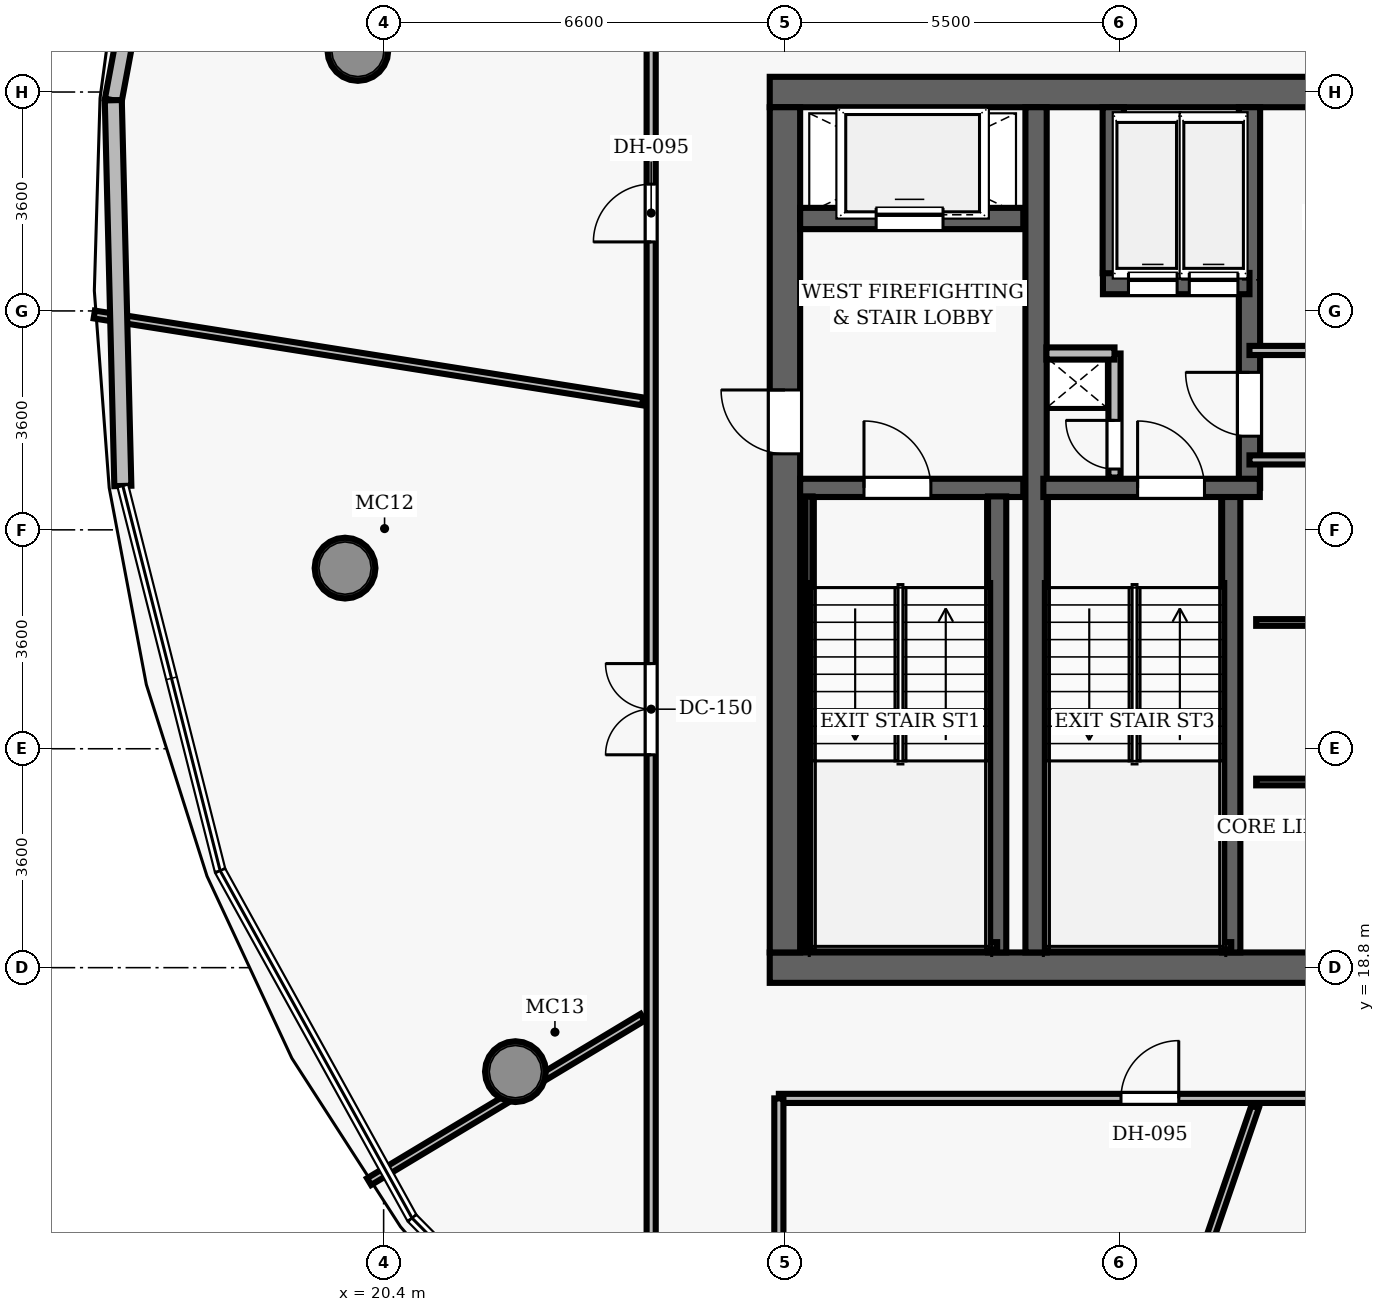
"""IFC4 building model, lengths in metres.
Left out: names, types, materials, properties, quantities, classifications, styles, units other than length and angle.
Written with IfcOpenShell. Run it as: python <this file> out.ifc"""

import sys

from ifc_helpers import new_model, si_unit, direction, frame, frame_2d, origin, origin_2d, place, context, subcontext, project, spatial, rectangle, hollow_circle, extrude, element, fill, save


model = new_model("IFC4")
c1 = context("Model", 3, precision=1e-05, world=origin(), true_north=direction((0.0, 1.0)))
c2 = subcontext(c1, "Body", "Model", "MODEL_VIEW")
j1 = project(units=[si_unit("LENGTHUNIT", "METRE"), si_unit("PLANEANGLEUNIT", "RADIAN")], contexts=[c1])
p1 = place(None, origin())
s1 = spatial("IfcSite", under=j1, at=p1, CompositionType="ELEMENT")
p2 = place(p1, origin())
s2 = spatial("IfcBuilding", under=s1, at=p2, CompositionType="ELEMENT")
p3 = place(p2, frame((0.0, 0.0, 245.9)))
s3 = spatial("IfcBuildingStorey", under=s2, at=p3, CompositionType="ELEMENT", Elevation=245.9)
p4 = place(p3, frame((26.75, 18.8, 0.0), z_axis=(0.0, 0.0, 1.0), x_axis=(1.0, 0.0, 0.0)))
e1 = element("IfcWall", 1, at=p4, inside=s3, PredefinedType="SHEAR", context=c2, shape_type="SweptSolid", body=[
    extrude(rectangle(XDim=22.5, YDim=0.5, at=frame_2d((11.25, 0.0))), origin(), (0.0, 0.0, 1.0), 3.85),
])
p5 = place(p4, frame((14.47, 0.0, 0.0)))
e2 = element("IfcOpeningElement", 2, at=p5, cuts=e1, PredefinedType="OPENING", context=c2, shape_type="SweptSolid", body=[
    extrude(rectangle(XDim=1.05, YDim=2.15, at=frame_2d((0.525, 1.075))), frame((0.0, 0.26, 0.0), z_axis=(0.0, -1.0, 0.0), x_axis=(1.0, 0.0, 0.0)), (0.0, 0.0, 1.0), 0.52),
])
p6 = place(p3, frame((26.75, 33.2, 0.0), z_axis=(0.0, 0.0, 1.0), x_axis=(1.0, 0.0, 0.0)))
e3 = element("IfcWall", 3, at=p6, inside=s3, PredefinedType="SHEAR", context=c2, shape_type="SweptSolid", body=[
    extrude(rectangle(XDim=22.5, YDim=0.5, at=frame_2d((11.25, 0.0))), origin(), (0.0, 0.0, 1.0), 3.85),
])
p7 = place(p3, frame((27.0, 19.05, 0.0), z_axis=(0.0, 0.0, 1.0), x_axis=(0.0, 1.0, 0.0)))
e4 = element("IfcWall", 4, at=p7, inside=s3, PredefinedType="SHEAR", context=c2, shape_type="SweptSolid", body=[
    extrude(rectangle(XDim=13.9, YDim=0.5, at=frame_2d((6.95, 0.0))), origin(), (0.0, 0.0, 1.0), 3.85),
])
p8 = place(p7, frame((8.2, 0.0, 0.0)))
e5 = element("IfcOpeningElement", 5, at=p8, cuts=e4, PredefinedType="OPENING", context=c2, shape_type="SweptSolid", body=[
    extrude(rectangle(XDim=1.05, YDim=2.15, at=frame_2d((0.525, 1.075))), frame((0.0, 0.26, 0.0), z_axis=(0.0, -1.0, 0.0), x_axis=(1.0, 0.0, 0.0)), (0.0, 0.0, 1.0), 0.52),
])
p9 = place(p3, frame((31.13, 19.05, 0.0), z_axis=(0.0, 0.0, 1.0), x_axis=(0.0, 1.0, 0.0)))
e6 = element("IfcWall", 6, at=p9, inside=s3, PredefinedType="SHEAR", context=c2, shape_type="SweptSolid", body=[
    extrude(rectangle(XDim=13.9, YDim=0.35, at=frame_2d((6.95, 0.0))), origin(), (0.0, 0.0, 1.0), 3.85),
])
for number, where, z_axis, x_axis in (
    (7, (19.976, 33.884, 0.0), (0.0, 0.0, 1.0), (1.0, 0.0, 0.0)),
    (8, (19.765, 25.371, 0.0), (0.0, 0.0, 1.0), (1.0, 0.0, 0.0)),
    (9, (22.567, 17.09, 0.0), (0.0, 0.0, 1.0), (1.0, 0.0, 0.0)),
):
    element("IfcColumn", number, at=place(p3, frame(where, z_axis=z_axis, x_axis=x_axis)), inside=s3, PredefinedType="COLUMN", context=c2, shape_type="SweptSolid", body=[
        extrude(hollow_circle(Radius=0.5, WallThickness=0.045, at=origin_2d()), origin(), (0.0, 0.0, 1.0), 3.85),
    ])
p10 = place(p3, frame((27.25, 26.69, 0.0), z_axis=(0.0, 0.0, 1.0), x_axis=(1.0, 0.0, 0.0)))
e10 = element("IfcWall", 10, at=p10, inside=s3, PredefinedType="SHEAR", context=c2, shape_type="SweptSolid", body=[
    extrude(rectangle(XDim=3.67, YDim=0.3, at=frame_2d((1.835, 0.0))), origin(), (0.0, 0.0, 1.0), 3.85),
])
p11 = place(p10, frame((1.05, 0.0, 0.0)))
e11 = element("IfcOpeningElement", 11, at=p11, cuts=e10, PredefinedType="OPENING", context=c2, shape_type="SweptSolid", body=[
    extrude(rectangle(XDim=1.1, YDim=2.15, at=frame_2d((0.55, 1.075))), frame((0.0, 0.16, 0.0), z_axis=(0.0, -1.0, 0.0), x_axis=(1.0, 0.0, 0.0)), (0.0, 0.0, 1.0), 0.32),
])
p12 = place(p3, frame((30.49, 19.05, 0.0), z_axis=(0.0, 0.0, 1.0), x_axis=(0.0, 1.0, 0.0)))
e12 = element("IfcWall", 12, at=p12, inside=s3, PredefinedType="SHEAR", context=c2, shape_type="SweptSolid", body=[
    extrude(rectangle(XDim=7.5, YDim=0.3, at=frame_2d((3.75, 0.0))), origin(), (0.0, 0.0, 1.0), 3.85),
])
p13 = place(p3, frame((27.395, 19.1, 0.0), z_axis=(0.0, 0.0, 1.0), x_axis=(0.0, 1.0, 0.0)))
e13 = element("IfcWall", 13, at=p13, inside=s3, PredefinedType="SHEAR", context=c2, shape_type="SweptSolid", body=[
    extrude(rectangle(XDim=7.45, YDim=0.12, at=frame_2d((3.725, 0.0))), origin(), (0.0, 0.0, 1.0), 3.85),
])
p14 = place(p3, frame((27.395, 19.16, 0.0), z_axis=(0.0, 0.0, 1.0), x_axis=(1.0, 0.0, 0.0)))
e14 = element("IfcWall", 14, at=p14, inside=s3, PredefinedType="SHEAR", context=c2, shape_type="SweptSolid", body=[
    extrude(rectangle(XDim=3.095, YDim=0.12, at=frame_2d((1.547, 0.0))), origin(), (0.0, 0.0, 1.0), 3.85),
])
p15 = place(p3, frame((27.25, 31.12, 0.0), z_axis=(0.0, 0.0, 1.0), x_axis=(1.0, 0.0, 0.0)))
e15 = element("IfcWall", 15, at=p15, inside=s3, PredefinedType="SHEAR", context=c2, shape_type="SweptSolid", body=[
    extrude(rectangle(XDim=3.67, YDim=0.35, at=frame_2d((1.835, 0.0))), origin(), (0.0, 0.0, 1.0), 3.04),
])
p16 = place(p15, frame((1.25, 0.0, 0.0)))
e16 = element("IfcOpeningElement", 16, at=p16, cuts=e15, PredefinedType="OPENING", context=c2, shape_type="SweptSolid", body=[
    extrude(rectangle(XDim=1.1, YDim=2.15, at=frame_2d((0.55, 1.075))), frame((0.0, 0.185, 0.0), z_axis=(0.0, -1.0, 0.0), x_axis=(1.0, 0.0, 0.0)), (0.0, 0.0, 1.0), 0.37),
])
p17 = place(p3, frame((34.34, 19.05, 0.0), z_axis=(0.0, 0.0, 1.0), x_axis=(0.0, 1.0, 0.0)))
e17 = element("IfcWall", 17, at=p17, inside=s3, PredefinedType="SHEAR", context=c2, shape_type="SweptSolid", body=[
    extrude(rectangle(XDim=7.5, YDim=0.3, at=frame_2d((3.75, 0.0))), origin(), (0.0, 0.0, 1.0), 3.85),
])
p18 = place(p3, frame((34.64, 26.69, 0.0), z_axis=(0.0, 0.0, 1.0), x_axis=(0.0, 1.0, 0.0)))
e18 = element("IfcWall", 18, at=p18, inside=s3, PredefinedType="SHEAR", context=c2, shape_type="SweptSolid", body=[
    extrude(rectangle(XDim=6.26, YDim=0.35, at=frame_2d((3.13, 0.0))), origin(), (0.0, 0.0, 1.0), 3.85),
])
p19 = place(p18, frame((0.85, 0.0, 0.0)))
e19 = element("IfcOpeningElement", 19, at=p19, cuts=e18, PredefinedType="OPENING", context=c2, shape_type="SweptSolid", body=[
    extrude(rectangle(XDim=1.05, YDim=2.15, at=frame_2d((0.525, 1.075))), frame((0.0, 0.185, 0.0), z_axis=(0.0, -1.0, 0.0), x_axis=(1.0, 0.0, 0.0)), (0.0, 0.0, 1.0), 0.37),
])
p20 = place(p3, frame((31.25, 26.69, 0.0), z_axis=(0.0, 0.0, 1.0), x_axis=(1.0, 0.0, 0.0)))
e20 = element("IfcWall", 20, at=p20, inside=s3, PredefinedType="SHEAR", context=c2, shape_type="SweptSolid", body=[
    extrude(rectangle(XDim=3.56, YDim=0.3, at=frame_2d((1.78, 0.0))), origin(), (0.0, 0.0, 1.0), 3.85),
])
p21 = place(p20, frame((1.55, 0.0, 0.0)))
e21 = element("IfcOpeningElement", 21, at=p21, cuts=e20, PredefinedType="OPENING", context=c2, shape_type="SweptSolid", body=[
    extrude(rectangle(XDim=1.1, YDim=2.15, at=frame_2d((0.55, 1.075))), frame((0.0, 0.16, 0.0), z_axis=(0.0, -1.0, 0.0), x_axis=(1.0, 0.0, 0.0)), (0.0, 0.0, 1.0), 0.32),
])
p22 = place(p3, frame((31.3, 19.16, 0.0), z_axis=(0.0, 0.0, 1.0), x_axis=(1.0, 0.0, 0.0)))
e22 = element("IfcWall", 22, at=p22, inside=s3, PredefinedType="SHEAR", context=c2, shape_type="SweptSolid", body=[
    extrude(rectangle(XDim=3.04, YDim=0.12, at=frame_2d((1.52, 0.0))), origin(), (0.0, 0.0, 1.0), 3.85),
])
p23 = place(p3, frame((32.23, 30.05, 0.0), z_axis=(0.0, 0.0, 1.0), x_axis=(1.0, 0.0, 0.0)))
e23 = element("IfcWall", 23, at=p23, inside=s3, PredefinedType="SHEAR", context=c2, shape_type="SweptSolid", body=[
    extrude(rectangle(XDim=2.41, YDim=0.35, at=frame_2d((1.205, 0.0))), origin(), (0.0, 0.0, 1.0), 3.04),
])
p24 = place(p23, frame((0.42, 0.0, 0.0)))
e24 = element("IfcOpeningElement", 24, at=p24, cuts=e23, PredefinedType="OPENING", context=c2, shape_type="SweptSolid", body=[
    extrude(rectangle(XDim=0.8, YDim=2.15, at=frame_2d((0.4, 1.075))), frame((0.0, 0.185, 0.0), z_axis=(0.0, -1.0, 0.0), x_axis=(1.0, 0.0, 0.0)), (0.0, 0.0, 1.0), 0.37),
])
p25 = place(p23, frame((1.42, 0.0, 0.0)))
e25 = element("IfcOpeningElement", 25, at=p25, cuts=e23, PredefinedType="OPENING", context=c2, shape_type="SweptSolid", body=[
    extrude(rectangle(XDim=0.8, YDim=2.15, at=frame_2d((0.4, 1.075))), frame((0.0, 0.185, 0.0), z_axis=(0.0, -1.0, 0.0), x_axis=(1.0, 0.0, 0.0)), (0.0, 0.0, 1.0), 0.37),
])
p26 = place(p3, frame((32.4, 30.22, 0.0), z_axis=(0.0, 0.0, 1.0), x_axis=(0.0, 1.0, 0.0)))
e26 = element("IfcWall", 26, at=p26, inside=s3, PredefinedType="SHEAR", context=c2, shape_type="SweptSolid", body=[
    extrude(rectangle(XDim=2.73, YDim=0.35, at=frame_2d((1.365, 0.0))), origin(), (0.0, 0.0, 1.0), 3.04),
])
p27 = place(p3, frame((32.42, 26.86, 0.0), z_axis=(0.0, 0.0, 1.0), x_axis=(0.0, 1.0, 0.0)))
e27 = element("IfcWall", 27, at=p27, inside=s3, PredefinedType="PARTITIONING", context=c2, shape_type="SweptSolid", body=[
    extrude(rectangle(XDim=2.04, YDim=0.2, at=frame_2d((1.02, 0.0))), origin(), (0.0, 0.0, 1.0), 3.04),
])
p28 = place(p27, frame((0.14, 0.0, 0.0)))
e28 = element("IfcOpeningElement", 28, at=p28, cuts=e27, PredefinedType="OPENING", context=c2, shape_type="SweptSolid", body=[
    extrude(rectangle(XDim=0.8, YDim=2.05, at=frame_2d((0.4, 1.025))), frame((0.0, 0.11, 0.0), z_axis=(0.0, -1.0, 0.0), x_axis=(1.0, 0.0, 0.0)), (0.0, 0.0, 1.0), 0.22),
])
p29 = place(p3, frame((31.3, 28.9, 0.0), z_axis=(0.0, 0.0, 1.0), x_axis=(1.0, 0.0, 0.0)))
e29 = element("IfcWall", 29, at=p29, inside=s3, PredefinedType="PARTITIONING", context=c2, shape_type="SweptSolid", body=[
    extrude(rectangle(XDim=1.12, YDim=0.2, at=frame_2d((0.56, 0.0))), origin(), (0.0, 0.0, 1.0), 3.04),
])
for number, where, z_axis, x_axis in (
    (30, (34.64, 27.15, 0.0), (0.0, 0.0, 1.0), (1.0, 0.0, 0.0)),
    (31, (34.64, 28.95, 0.0), (0.0, 0.0, 1.0), (1.0, 0.0, 0.0)),
):
    element("IfcWall", number, at=place(p3, frame(where, z_axis=z_axis, x_axis=x_axis)), inside=s3, PredefinedType="PARTITIONING", context=c2, shape_type="SweptSolid", body=[
        extrude(rectangle(XDim=6.36, YDim=0.15, at=frame_2d((3.18, 0.0))), origin(), (0.0, 0.0, 1.0), 3.04),
    ])
for number, where, z_axis, x_axis in (
    (32, (34.75, 21.853, 0.0), (0.0, 0.0, 1.0), (1.0, 0.0, 0.0)),
    (33, (34.75, 24.477, 0.0), (0.0, 0.0, 1.0), (1.0, 0.0, 0.0)),
):
    element("IfcWall", number, at=place(p3, frame(where, z_axis=z_axis, x_axis=x_axis)), inside=s3, PredefinedType="PARTITIONING", context=c2, shape_type="SweptSolid", body=[
        extrude(rectangle(XDim=6.25, YDim=0.11, at=frame_2d((3.125, 0.0))), origin(), (0.0, 0.0, 1.0), 3.04),
    ])
p30 = place(p3, frame((26.9, 16.65, 0.0), z_axis=(0.0, 0.0, 1.0), x_axis=(1.0, 0.0, 0.0)))
e34 = element("IfcWall", 34, at=p30, inside=s3, PredefinedType="PARTITIONING", context=c2, shape_type="SweptSolid", body=[
    extrude(rectangle(XDim=22.2, YDim=0.15, at=frame_2d((11.1, 0.0))), origin(), (0.0, 0.0, 1.0), 3.04),
])
p31 = place(p30, frame((5.627, 0.0, 0.0)))
e35 = element("IfcOpeningElement", 35, at=p31, cuts=e34, PredefinedType="OPENING", context=c2, shape_type="SweptSolid", body=[
    extrude(rectangle(XDim=0.95, YDim=2.15, at=frame_2d((0.475, 1.075))), frame((0.0, 0.085, 0.0), z_axis=(0.0, -1.0, 0.0), x_axis=(1.0, 0.0, 0.0)), (0.0, 0.0, 1.0), 0.17),
])
p32 = place(p30, frame((12.684, 0.0, 0.0)))
e36 = element("IfcOpeningElement", 36, at=p32, cuts=e34, PredefinedType="OPENING", context=c2, shape_type="SweptSolid", body=[
    extrude(rectangle(XDim=0.95, YDim=2.15, at=frame_2d((0.475, 1.075))), frame((0.0, 0.085, 0.0), z_axis=(0.0, -1.0, 0.0), x_axis=(1.0, 0.0, 0.0)), (0.0, 0.0, 1.0), 0.17),
])
p33 = place(p30, frame((15.904, 0.0, 0.0)))
e37 = element("IfcOpeningElement", 37, at=p33, cuts=e34, PredefinedType="OPENING", context=c2, shape_type="SweptSolid", body=[
    extrude(rectangle(XDim=0.95, YDim=2.15, at=frame_2d((0.475, 1.075))), frame((0.0, 0.085, 0.0), z_axis=(0.0, -1.0, 0.0), x_axis=(1.0, 0.0, 0.0)), (0.0, 0.0, 1.0), 0.17),
])
p34 = place(p3, frame((24.8, 11.29, 0.0), z_axis=(0.0, 0.0, 1.0), x_axis=(0.0, 1.0, 0.0)))
e38 = element("IfcWall", 38, at=p34, inside=s3, PredefinedType="PARTITIONING", context=c2, shape_type="SweptSolid", body=[
    extrude(rectangle(XDim=30.11, YDim=0.15, at=frame_2d((15.055, 0.0))), origin(), (0.0, 0.0, 1.0), 3.04),
])
p35 = place(p34, frame((19.445, 0.0, 0.0)))
e39 = element("IfcOpeningElement", 39, at=p35, cuts=e38, PredefinedType="OPENING", context=c2, shape_type="SweptSolid", body=[
    extrude(rectangle(XDim=0.95, YDim=2.15, at=frame_2d((0.475, 1.075))), frame((0.0, 0.085, 0.0), z_axis=(0.0, -1.0, 0.0), x_axis=(1.0, 0.0, 0.0)), (0.0, 0.0, 1.0), 0.17),
])
p36 = place(p34, frame((11.011, 0.0, 0.0)))
e40 = element("IfcOpeningElement", 40, at=p36, cuts=e38, PredefinedType="OPENING", context=c2, shape_type="SweptSolid", body=[
    extrude(rectangle(XDim=1.5, YDim=2.2, at=frame_2d((0.75, 1.1))), frame((0.0, 0.085, 0.0), z_axis=(0.0, -1.0, 0.0), x_axis=(1.0, 0.0, 0.0)), (0.0, 0.0, 1.0), 0.17),
])
p37 = place(p3, frame((26.9, 11.29, 0.0), z_axis=(0.0, 0.0, 1.0), x_axis=(0.0, 1.0, 0.0)))
e41 = element("IfcWall", 41, at=p37, inside=s3, PredefinedType="PARTITIONING", context=c2, shape_type="SweptSolid", body=[
    extrude(rectangle(XDim=5.36, YDim=0.15, at=frame_2d((2.68, 0.0))), origin(), (0.0, 0.0, 1.0), 3.04),
])
p38 = place(p3, frame((24.66, 28.113, 0.0), z_axis=(0.0, 0.0, 1.0), x_axis=(-0.98768784325, 0.156437605123, 0.0)))
e42 = element("IfcWall", 42, at=p38, inside=s3, PredefinedType="PARTITIONING", context=c2, shape_type="SweptSolid", body=[
    extrude(rectangle(XDim=9.131, YDim=0.13, at=frame_2d((4.565, 0.0))), origin(), (0.0, 0.0, 1.0), 3.04),
])
p39 = place(p3, frame((24.66, 17.985, 0.0), z_axis=(0.0, 0.0, 1.0), x_axis=(-0.857152112753, -0.515063351057, 0.0)))
e43 = element("IfcWall", 43, at=p39, inside=s3, PredefinedType="PARTITIONING", context=c2, shape_type="SweptSolid", body=[
    extrude(rectangle(XDim=5.249, YDim=0.13, at=frame_2d((2.625, 0.0))), origin(), (0.0, 0.0, 1.0), 3.04),
])
p40 = place(p3, frame((34.732, 16.51, 0.0), z_axis=(0.0, 0.0, 1.0), x_axis=(-0.325579978914, -0.945514504029, 0.0)))
e44 = element("IfcWall", 44, at=p40, inside=s3, PredefinedType="PARTITIONING", context=c2, shape_type="SweptSolid", body=[
    extrude(rectangle(XDim=10.461, YDim=0.13, at=frame_2d((5.231, 0.0))), origin(), (0.0, 0.0, 1.0), 3.04),
])
p41 = place(p3, frame((15.954, 33.065, 0.0), z_axis=(0.0, 0.0, 1.0), x_axis=(0.183191664763, 0.983077216683, 0.0)))
e45 = element("IfcWall", 45, at=p41, inside=s3, PredefinedType="SOLIDWALL", context=c2, shape_type="SweptSolid", body=[
    extrude(rectangle(XDim=5.86, YDim=0.28, at=frame_2d((2.93, 0.0))), origin(), (0.0, 0.0, 1.0), 3.625),
])
p42 = place(p3, frame((16.111, 26.722, 0.0), z_axis=(0.0, 0.0, 1.0), x_axis=(-0.024778780137, 0.99969295889, 0.0)))
e46 = element("IfcWall", 46, at=p42, inside=s3, PredefinedType="SOLIDWALL", context=c2, shape_type="SweptSolid", body=[
    extrude(rectangle(XDim=6.345, YDim=0.28, at=frame_2d((3.173, 0.0))), origin(), (0.0, 0.0, 1.0), 3.625),
])
p43 = place(p11, origin())
e47 = element("IfcDoor", 47, at=p43, inside=s3, OperationType="SINGLE_SWING_LEFT", PredefinedType="DOOR", context=c2, shape_type="SweptSolid", body=[
    extrude(rectangle(XDim=1.1, YDim=2.15, at=frame_2d((0.55, 1.075))), frame((0.0, 0.025, 0.0), z_axis=(0.0, -1.0, 0.0), x_axis=(1.0, 0.0, 0.0)), (0.0, 0.0, 1.0), 0.05),
])
fill(e11, e47)
p44 = place(p8, origin())
e48 = element("IfcDoor", 48, at=p44, inside=s3, OperationType="SINGLE_SWING_RIGHT", PredefinedType="DOOR", context=c2, shape_type="SweptSolid", body=[
    extrude(rectangle(XDim=1.05, YDim=2.15, at=frame_2d((0.525, 1.075))), frame((0.0, 0.025, 0.0), z_axis=(0.0, -1.0, 0.0), x_axis=(1.0, 0.0, 0.0)), (0.0, 0.0, 1.0), 0.05),
])
fill(e5, e48)
p45 = place(p21, origin())
e49 = element("IfcDoor", 49, at=p45, inside=s3, OperationType="SINGLE_SWING_LEFT", PredefinedType="DOOR", context=c2, shape_type="SweptSolid", body=[
    extrude(rectangle(XDim=1.1, YDim=2.15, at=frame_2d((0.55, 1.075))), frame((0.0, 0.025, 0.0), z_axis=(0.0, -1.0, 0.0), x_axis=(1.0, 0.0, 0.0)), (0.0, 0.0, 1.0), 0.05),
])
fill(e21, e49)
p46 = place(p28, origin())
e50 = element("IfcDoor", 50, at=p46, inside=s3, OperationType="SINGLE_SWING_RIGHT", PredefinedType="DOOR", context=c2, shape_type="SweptSolid", body=[
    extrude(rectangle(XDim=0.8, YDim=2.05, at=frame_2d((0.4, 1.025))), frame((0.0, 0.025, 0.0), z_axis=(0.0, -1.0, 0.0), x_axis=(1.0, 0.0, 0.0)), (0.0, 0.0, 1.0), 0.05),
])
fill(e28, e50)
p47 = place(p19, origin())
e51 = element("IfcDoor", 51, at=p47, inside=s3, OperationType="SINGLE_SWING_RIGHT", PredefinedType="DOOR", context=c2, shape_type="SweptSolid", body=[
    extrude(rectangle(XDim=1.05, YDim=2.15, at=frame_2d((0.525, 1.075))), frame((0.0, 0.025, 0.0), z_axis=(0.0, -1.0, 0.0), x_axis=(1.0, 0.0, 0.0)), (0.0, 0.0, 1.0), 0.05),
])
fill(e19, e51)
p48 = place(p35, origin())
e52 = element("IfcDoor", 52, at=p48, inside=s3, OperationType="SINGLE_SWING_LEFT", PredefinedType="DOOR", context=c2, shape_type="SweptSolid", body=[
    extrude(rectangle(XDim=0.95, YDim=2.15, at=frame_2d((0.475, 1.075))), frame((0.0, 0.025, 0.0), z_axis=(0.0, -1.0, 0.0), x_axis=(1.0, 0.0, 0.0)), (0.0, 0.0, 1.0), 0.05),
])
fill(e39, e52)
p49 = place(p36, origin())
e53 = element("IfcDoor", 53, at=p49, inside=s3, OperationType="DOUBLE_DOOR_SINGLE_SWING", PredefinedType="DOOR", context=c2, shape_type="SweptSolid", body=[
    extrude(rectangle(XDim=1.5, YDim=2.2, at=frame_2d((0.75, 1.1))), frame((0.0, 0.025, 0.0), z_axis=(0.0, -1.0, 0.0), x_axis=(1.0, 0.0, 0.0)), (0.0, 0.0, 1.0), 0.05),
])
fill(e40, e53)
p50 = place(p31, origin())
e54 = element("IfcDoor", 54, at=p50, inside=s3, OperationType="SINGLE_SWING_RIGHT", PredefinedType="DOOR", context=c2, shape_type="SweptSolid", body=[
    extrude(rectangle(XDim=0.95, YDim=2.15, at=frame_2d((0.475, 1.075))), frame((0.0, 0.025, 0.0), z_axis=(0.0, -1.0, 0.0), x_axis=(1.0, 0.0, 0.0)), (0.0, 0.0, 1.0), 0.05),
])
fill(e35, e54)
p51 = place(p16, origin())
e55 = element("IfcDoor", 55, at=p51, inside=s3, OperationType="SLIDING_TO_LEFT", PredefinedType="DOOR", context=c2, shape_type="SweptSolid", body=[
    extrude(rectangle(XDim=1.1, YDim=2.15, at=frame_2d((0.55, 1.075))), frame((0.0, 0.025, 0.0), z_axis=(0.0, -1.0, 0.0), x_axis=(1.0, 0.0, 0.0)), (0.0, 0.0, 1.0), 0.05),
])
fill(e16, e55)
p52 = place(p24, origin())
e56 = element("IfcDoor", 56, at=p52, inside=s3, OperationType="SLIDING_TO_LEFT", PredefinedType="DOOR", context=c2, shape_type="SweptSolid", body=[
    extrude(rectangle(XDim=0.8, YDim=2.15, at=frame_2d((0.4, 1.075))), frame((0.0, 0.025, 0.0), z_axis=(0.0, -1.0, 0.0), x_axis=(1.0, 0.0, 0.0)), (0.0, 0.0, 1.0), 0.05),
])
fill(e24, e56)
p53 = place(p25, origin())
e57 = element("IfcDoor", 57, at=p53, inside=s3, OperationType="SLIDING_TO_LEFT", PredefinedType="DOOR", context=c2, shape_type="SweptSolid", body=[
    extrude(rectangle(XDim=0.8, YDim=2.15, at=frame_2d((0.4, 1.075))), frame((0.0, 0.025, 0.0), z_axis=(0.0, -1.0, 0.0), x_axis=(1.0, 0.0, 0.0)), (0.0, 0.0, 1.0), 0.05),
])
fill(e25, e57)
save(model, sys.argv[1])
